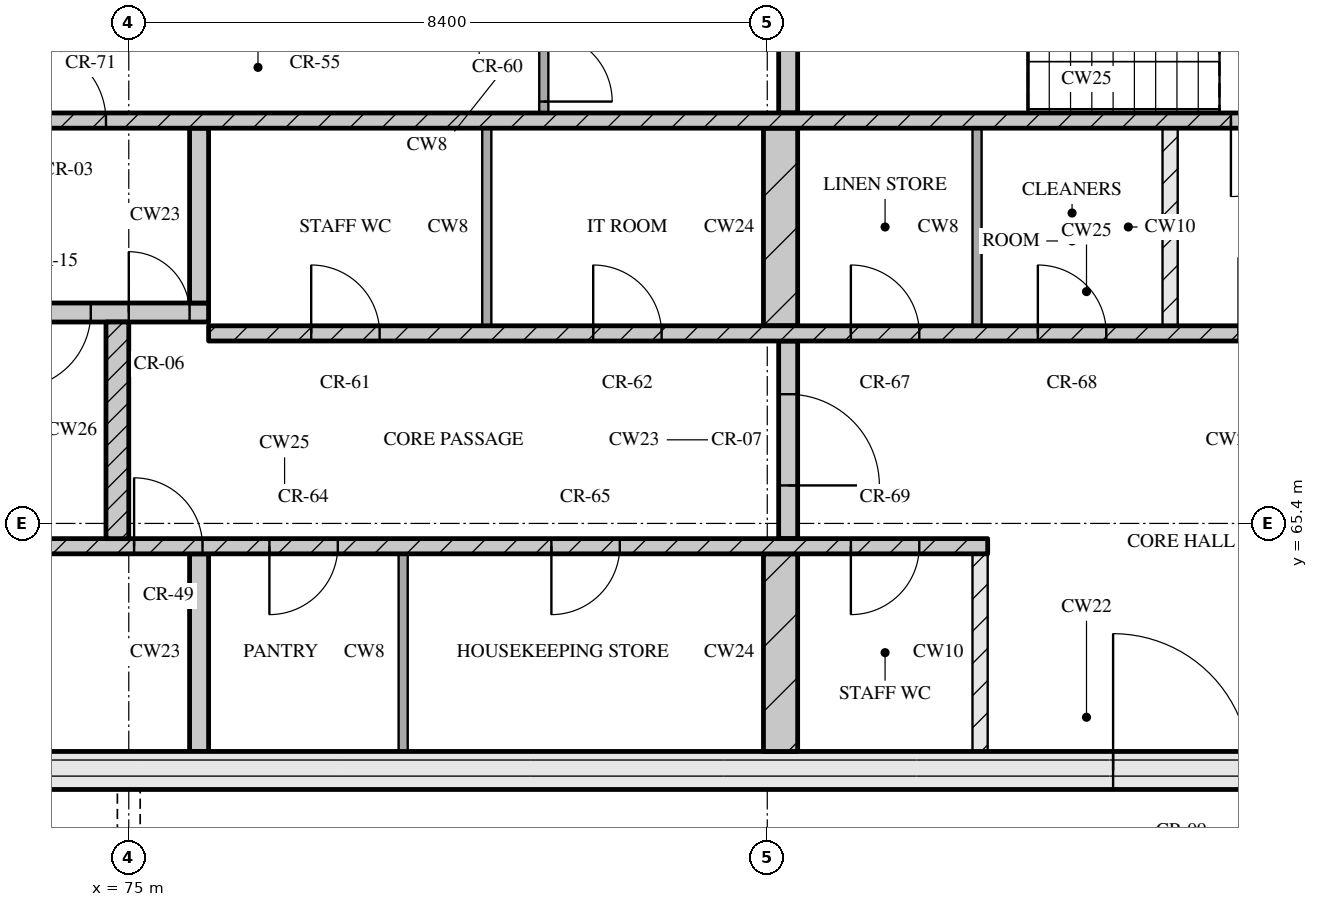
"""IFC4 building model, lengths in metres.
Left out: names, types, materials, properties, quantities, classifications, styles, units other than length and angle.
Written with IfcOpenShell. Run it as: python <this file> out.ifc"""

import sys

from ifc_helpers import new_model, si_unit, direction, frame, frame_2d, origin, place, context, subcontext, project, spatial, rectangle, extrude, element, fill, save


model = new_model("IFC4")
c1 = context("Model", 3, precision=1e-05, world=origin(), true_north=direction((0.0, 1.0)))
c2 = subcontext(c1, "Body", "Model", "MODEL_VIEW")
j1 = project(units=[si_unit("LENGTHUNIT", "METRE"), si_unit("PLANEANGLEUNIT", "RADIAN")], contexts=[c1])
p1 = place(None, origin())
s1 = spatial("IfcSite", under=j1, at=p1, CompositionType="ELEMENT")
p2 = place(p1, origin())
s2 = spatial("IfcBuilding", under=s1, at=p2, CompositionType="ELEMENT")
p3 = place(p2, frame((0.0, 0.0, 281.55)))
s3 = spatial("IfcBuildingStorey", under=s2, at=p3, CompositionType="ELEMENT", Elevation=281.55)
p4 = place(p3, frame((67.3, 62.15, 0.0), z_axis=(0.0, 0.0, 1.0), x_axis=(1.0, 0.0, 0.0)))
e1 = element("IfcWall", 1, at=p4, inside=s3, PredefinedType="SOLIDWALL", context=c2, shape_type="SweptSolid", body=[
    extrude(rectangle(XDim=40.6, YDim=0.5, at=frame_2d((20.3, 0.0))), origin(), (0.0, 0.0, 1.0), 3.32),
])
p5 = place(p4, frame((20.65, 0.0, 0.0)))
e2 = element("IfcOpeningElement", 2, at=p5, cuts=e1, PredefinedType="OPENING", context=c2, shape_type="SweptSolid", body=[
    extrude(rectangle(XDim=1.8, YDim=2.1, at=frame_2d((0.9, 1.05))), frame((0.0, 0.26, 0.0), z_axis=(0.0, -1.0, 0.0), x_axis=(1.0, 0.0, 0.0)), (0.0, 0.0, 1.0), 0.52),
])
p6 = place(p3, frame((75.925, 62.4, 0.0), z_axis=(0.0, 0.0, 1.0), x_axis=(0.0, 1.0, 0.0)))
e3 = element("IfcWall", 3, at=p6, inside=s3, PredefinedType="SOLIDWALL", context=c2, shape_type="SweptSolid", body=[
    extrude(rectangle(XDim=2.6, YDim=0.25, at=frame_2d((1.3, 0.0))), origin(), (0.0, 0.0, 1.0), 3.32),
])
p7 = place(p3, frame((78.61, 62.4, 0.0), z_axis=(0.0, 0.0, 1.0), x_axis=(0.0, 1.0, 0.0)))
e4 = element("IfcWall", 4, at=p7, inside=s3, PredefinedType="PARTITIONING", context=c2, shape_type="SweptSolid", body=[
    extrude(rectangle(XDim=2.6, YDim=0.12, at=frame_2d((1.3, 0.0))), origin(), (0.0, 0.0, 1.0), 3.32),
])
p8 = place(p3, frame((83.575, 62.4, 0.0), z_axis=(0.0, 0.0, 1.0), x_axis=(0.0, 1.0, 0.0)))
e5 = element("IfcWall", 5, at=p8, inside=s3, PredefinedType="SOLIDWALL", context=c2, shape_type="SweptSolid", body=[
    extrude(rectangle(XDim=2.6, YDim=0.45, at=frame_2d((1.3, 0.0))), origin(), (0.0, 0.0, 1.0), 3.32),
])
p9 = place(p3, frame((86.2, 62.4, 0.0), z_axis=(0.0, 0.0, 1.0), x_axis=(0.0, 1.0, 0.0)))
e6 = element("IfcWall", 6, at=p9, inside=s3, PredefinedType="PARTITIONING", context=c2, shape_type="SweptSolid", body=[
    extrude(rectangle(XDim=2.6, YDim=0.2, at=frame_2d((1.3, 0.0))), origin(), (0.0, 0.0, 1.0), 3.32),
])
p10 = place(p3, frame((67.8, 65.1, 0.0), z_axis=(0.0, 0.0, 1.0), x_axis=(1.0, 0.0, 0.0)))
e7 = element("IfcWall", 7, at=p10, inside=s3, PredefinedType="SOLIDWALL", context=c2, shape_type="SweptSolid", body=[
    extrude(rectangle(XDim=18.5, YDim=0.2, at=frame_2d((9.25, 0.0))), origin(), (0.0, 0.0, 1.0), 3.32),
])
p11 = place(p10, frame((7.27, 0.0, 0.0)))
e8 = element("IfcOpeningElement", 8, at=p11, cuts=e7, PredefinedType="OPENING", context=c2, shape_type="SweptSolid", body=[
    extrude(rectangle(XDim=0.9, YDim=2.1, at=frame_2d((0.45, 1.05))), frame((0.0, 0.11, 0.0), z_axis=(0.0, -1.0, 0.0), x_axis=(1.0, 0.0, 0.0)), (0.0, 0.0, 1.0), 0.22),
])
p12 = place(p10, frame((9.05, 0.0, 0.0)))
e9 = element("IfcOpeningElement", 9, at=p12, cuts=e7, PredefinedType="OPENING", context=c2, shape_type="SweptSolid", body=[
    extrude(rectangle(XDim=0.9, YDim=2.1, at=frame_2d((0.45, 1.05))), frame((0.0, 0.11, 0.0), z_axis=(0.0, -1.0, 0.0), x_axis=(1.0, 0.0, 0.0)), (0.0, 0.0, 1.0), 0.22),
])
p13 = place(p10, frame((12.76, 0.0, 0.0)))
e10 = element("IfcOpeningElement", 10, at=p13, cuts=e7, PredefinedType="OPENING", context=c2, shape_type="SweptSolid", body=[
    extrude(rectangle(XDim=0.9, YDim=2.1, at=frame_2d((0.45, 1.05))), frame((0.0, 0.11, 0.0), z_axis=(0.0, -1.0, 0.0), x_axis=(1.0, 0.0, 0.0)), (0.0, 0.0, 1.0), 0.22),
])
p14 = place(p10, frame((16.7, 0.0, 0.0)))
e11 = element("IfcOpeningElement", 11, at=p14, cuts=e7, PredefinedType="OPENING", context=c2, shape_type="SweptSolid", body=[
    extrude(rectangle(XDim=0.9, YDim=2.1, at=frame_2d((0.45, 1.05))), frame((0.0, 0.11, 0.0), z_axis=(0.0, -1.0, 0.0), x_axis=(1.0, 0.0, 0.0)), (0.0, 0.0, 1.0), 0.22),
])
p15 = place(p3, frame((74.85, 65.2, 0.0), z_axis=(0.0, 0.0, 1.0), x_axis=(0.0, 1.0, 0.0)))
e12 = element("IfcWall", 12, at=p15, inside=s3, PredefinedType="SOLIDWALL", context=c2, shape_type="SweptSolid", body=[
    extrude(rectangle(XDim=2.85, YDim=0.3, at=frame_2d((1.425, 0.0))), origin(), (0.0, 0.0, 1.0), 3.32),
])
p16 = place(p3, frame((83.675, 65.2, 0.0), z_axis=(0.0, 0.0, 1.0), x_axis=(0.0, 1.0, 0.0)))
e13 = element("IfcWall", 13, at=p16, inside=s3, PredefinedType="SOLIDWALL", context=c2, shape_type="SweptSolid", body=[
    extrude(rectangle(XDim=2.6, YDim=0.25, at=frame_2d((1.3, 0.0))), origin(), (0.0, 0.0, 1.0), 3.32),
])
p17 = place(p16, frame((0.7, 0.0, 0.0)))
e14 = element("IfcOpeningElement", 14, at=p17, cuts=e13, PredefinedType="OPENING", context=c2, shape_type="SweptSolid", body=[
    extrude(rectangle(XDim=1.2, YDim=2.1, at=frame_2d((0.6, 1.05))), frame((0.0, 0.135, 0.0), z_axis=(0.0, -1.0, 0.0), x_axis=(1.0, 0.0, 0.0)), (0.0, 0.0, 1.0), 0.27),
])
p18 = place(p3, frame((76.05, 67.9, 0.0), z_axis=(0.0, 0.0, 1.0), x_axis=(1.0, 0.0, 0.0)))
e15 = element("IfcWall", 15, at=p18, inside=s3, PredefinedType="SOLIDWALL", context=c2, shape_type="SweptSolid", body=[
    extrude(rectangle(XDim=23.1, YDim=0.2, at=frame_2d((11.55, 0.0))), origin(), (0.0, 0.0, 1.0), 3.32),
])
p19 = place(p18, frame((1.35, 0.0, 0.0)))
e16 = element("IfcOpeningElement", 16, at=p19, cuts=e15, PredefinedType="OPENING", context=c2, shape_type="SweptSolid", body=[
    extrude(rectangle(XDim=0.9, YDim=2.1, at=frame_2d((0.45, 1.05))), frame((0.0, 0.11, 0.0), z_axis=(0.0, -1.0, 0.0), x_axis=(1.0, 0.0, 0.0)), (0.0, 0.0, 1.0), 0.22),
])
p20 = place(p18, frame((5.06, 0.0, 0.0)))
e17 = element("IfcOpeningElement", 17, at=p20, cuts=e15, PredefinedType="OPENING", context=c2, shape_type="SweptSolid", body=[
    extrude(rectangle(XDim=0.9, YDim=2.1, at=frame_2d((0.45, 1.05))), frame((0.0, 0.11, 0.0), z_axis=(0.0, -1.0, 0.0), x_axis=(1.0, 0.0, 0.0)), (0.0, 0.0, 1.0), 0.22),
])
p21 = place(p18, frame((8.45, 0.0, 0.0)))
e18 = element("IfcOpeningElement", 18, at=p21, cuts=e15, PredefinedType="OPENING", context=c2, shape_type="SweptSolid", body=[
    extrude(rectangle(XDim=0.9, YDim=2.1, at=frame_2d((0.45, 1.05))), frame((0.0, 0.11, 0.0), z_axis=(0.0, -1.0, 0.0), x_axis=(1.0, 0.0, 0.0)), (0.0, 0.0, 1.0), 0.22),
])
p22 = place(p18, frame((10.91, 0.0, 0.0)))
e19 = element("IfcOpeningElement", 19, at=p22, cuts=e15, PredefinedType="OPENING", context=c2, shape_type="SweptSolid", body=[
    extrude(rectangle(XDim=0.9, YDim=2.1, at=frame_2d((0.45, 1.05))), frame((0.0, 0.11, 0.0), z_axis=(0.0, -1.0, 0.0), x_axis=(1.0, 0.0, 0.0)), (0.0, 0.0, 1.0), 0.22),
])
p23 = place(p18, frame((13.55, 0.0, 0.0)))
e20 = element("IfcOpeningElement", 20, at=p23, cuts=e15, PredefinedType="OPENING", context=c2, shape_type="SweptSolid", body=[
    extrude(rectangle(XDim=1.0, YDim=2.1, at=frame_2d((0.5, 1.05))), frame((0.0, 0.11, 0.0), z_axis=(0.0, -1.0, 0.0), x_axis=(1.0, 0.0, 0.0)), (0.0, 0.0, 1.0), 0.22),
])
p24 = place(p18, frame((16.2, 0.0, 0.0)))
e21 = element("IfcOpeningElement", 21, at=p24, cuts=e15, PredefinedType="OPENING", context=c2, shape_type="SweptSolid", body=[
    extrude(rectangle(XDim=1.1, YDim=2.1, at=frame_2d((0.55, 1.05))), frame((0.0, 0.11, 0.0), z_axis=(0.0, -1.0, 0.0), x_axis=(1.0, 0.0, 0.0)), (0.0, 0.0, 1.0), 0.22),
])
p25 = place(p18, frame((18.7, 0.0, 0.0)))
e22 = element("IfcOpeningElement", 22, at=p25, cuts=e15, PredefinedType="OPENING", context=c2, shape_type="SweptSolid", body=[
    extrude(rectangle(XDim=1.1, YDim=2.1, at=frame_2d((0.55, 1.05))), frame((0.0, 0.11, 0.0), z_axis=(0.0, -1.0, 0.0), x_axis=(1.0, 0.0, 0.0)), (0.0, 0.0, 1.0), 0.22),
])
p26 = place(p18, frame((21.2, 0.0, 0.0)))
e23 = element("IfcOpeningElement", 23, at=p26, cuts=e15, PredefinedType="OPENING", context=c2, shape_type="SweptSolid", body=[
    extrude(rectangle(XDim=1.1, YDim=2.1, at=frame_2d((0.55, 1.05))), frame((0.0, 0.11, 0.0), z_axis=(0.0, -1.0, 0.0), x_axis=(1.0, 0.0, 0.0)), (0.0, 0.0, 1.0), 0.22),
])
p27 = place(p3, frame((79.71, 68.0, 0.0), z_axis=(0.0, 0.0, 1.0), x_axis=(0.0, 1.0, 0.0)))
e24 = element("IfcWall", 24, at=p27, inside=s3, PredefinedType="PARTITIONING", context=c2, shape_type="SweptSolid", body=[
    extrude(rectangle(XDim=2.6, YDim=0.12, at=frame_2d((1.3, 0.0))), origin(), (0.0, 0.0, 1.0), 3.32),
])
p28 = place(p3, frame((83.575, 68.0, 0.0), z_axis=(0.0, 0.0, 1.0), x_axis=(0.0, 1.0, 0.0)))
e25 = element("IfcWall", 25, at=p28, inside=s3, PredefinedType="SOLIDWALL", context=c2, shape_type="SweptSolid", body=[
    extrude(rectangle(XDim=2.6, YDim=0.45, at=frame_2d((1.3, 0.0))), origin(), (0.0, 0.0, 1.0), 3.32),
])
p29 = place(p3, frame((86.16, 68.0, 0.0), z_axis=(0.0, 0.0, 1.0), x_axis=(0.0, 1.0, 0.0)))
e26 = element("IfcWall", 26, at=p29, inside=s3, PredefinedType="PARTITIONING", context=c2, shape_type="SweptSolid", body=[
    extrude(rectangle(XDim=2.6, YDim=0.12, at=frame_2d((1.3, 0.0))), origin(), (0.0, 0.0, 1.0), 3.32),
])
p30 = place(p3, frame((88.7, 68.0, 0.0), z_axis=(0.0, 0.0, 1.0), x_axis=(0.0, 1.0, 0.0)))
e27 = element("IfcWall", 27, at=p30, inside=s3, PredefinedType="PARTITIONING", context=c2, shape_type="SweptSolid", body=[
    extrude(rectangle(XDim=2.6, YDim=0.2, at=frame_2d((1.3, 0.0))), origin(), (0.0, 0.0, 1.0), 3.32),
])
p31 = place(p3, frame((67.8, 68.175, 0.0), z_axis=(0.0, 0.0, 1.0), x_axis=(1.0, 0.0, 0.0)))
e28 = element("IfcWall", 28, at=p31, inside=s3, PredefinedType="SOLIDWALL", context=c2, shape_type="SweptSolid", body=[
    extrude(rectangle(XDim=8.25, YDim=0.25, at=frame_2d((4.125, 0.0))), origin(), (0.0, 0.0, 1.0), 3.32),
])
p32 = place(p31, frame((5.7, 0.0, 0.0)))
e29 = element("IfcOpeningElement", 29, at=p32, cuts=e28, PredefinedType="OPENING", context=c2, shape_type="SweptSolid", body=[
    extrude(rectangle(XDim=1.0, YDim=2.1, at=frame_2d((0.5, 1.05))), frame((0.0, 0.135, 0.0), z_axis=(0.0, -1.0, 0.0), x_axis=(1.0, 0.0, 0.0)), (0.0, 0.0, 1.0), 0.27),
])
p33 = place(p31, frame((7.2, 0.0, 0.0)))
e30 = element("IfcOpeningElement", 30, at=p33, cuts=e28, PredefinedType="OPENING", context=c2, shape_type="SweptSolid", body=[
    extrude(rectangle(XDim=0.8, YDim=2.1, at=frame_2d((0.4, 1.05))), frame((0.0, 0.135, 0.0), z_axis=(0.0, -1.0, 0.0), x_axis=(1.0, 0.0, 0.0)), (0.0, 0.0, 1.0), 0.27),
])
p34 = place(p3, frame((75.925, 68.3, 0.0), z_axis=(0.0, 0.0, 1.0), x_axis=(0.0, 1.0, 0.0)))
e31 = element("IfcWall", 31, at=p34, inside=s3, PredefinedType="SOLIDWALL", context=c2, shape_type="SweptSolid", body=[
    extrude(rectangle(XDim=2.3, YDim=0.25, at=frame_2d((1.15, 0.0))), origin(), (0.0, 0.0, 1.0), 3.32),
])
p35 = place(p3, frame((67.8, 70.7, 0.0), z_axis=(0.0, 0.0, 1.0), x_axis=(1.0, 0.0, 0.0)))
e32 = element("IfcWall", 32, at=p35, inside=s3, PredefinedType="SOLIDWALL", context=c2, shape_type="SweptSolid", body=[
    extrude(rectangle(XDim=39.6, YDim=0.2, at=frame_2d((19.8, 0.0))), origin(), (0.0, 0.0, 1.0), 3.32),
])
p36 = place(p35, frame((0.65, 0.0, 0.0)))
e33 = element("IfcOpeningElement", 33, at=p36, cuts=e32, PredefinedType="OPENING", context=c2, shape_type="SweptSolid", body=[
    extrude(rectangle(XDim=1.1, YDim=2.1, at=frame_2d((0.55, 1.05))), frame((0.0, 0.11, 0.0), z_axis=(0.0, -1.0, 0.0), x_axis=(1.0, 0.0, 0.0)), (0.0, 0.0, 1.0), 0.22),
])
p37 = place(p35, frame((3.25, 0.0, 0.0)))
e34 = element("IfcOpeningElement", 34, at=p37, cuts=e32, PredefinedType="OPENING", context=c2, shape_type="SweptSolid", body=[
    extrude(rectangle(XDim=1.1, YDim=2.1, at=frame_2d((0.55, 1.05))), frame((0.0, 0.11, 0.0), z_axis=(0.0, -1.0, 0.0), x_axis=(1.0, 0.0, 0.0)), (0.0, 0.0, 1.0), 0.22),
])
p38 = place(p35, frame((5.9, 0.0, 0.0)))
e35 = element("IfcOpeningElement", 35, at=p38, cuts=e32, PredefinedType="OPENING", context=c2, shape_type="SweptSolid", body=[
    extrude(rectangle(XDim=1.0, YDim=2.1, at=frame_2d((0.5, 1.05))), frame((0.0, 0.11, 0.0), z_axis=(0.0, -1.0, 0.0), x_axis=(1.0, 0.0, 0.0)), (0.0, 0.0, 1.0), 0.22),
])
p39 = place(p35, frame((21.7, 0.0, 0.0)))
e36 = element("IfcOpeningElement", 36, at=p39, cuts=e32, PredefinedType="OPENING", context=c2, shape_type="SweptSolid", body=[
    extrude(rectangle(XDim=1.0, YDim=2.1, at=frame_2d((0.5, 1.05))), frame((0.0, 0.11, 0.0), z_axis=(0.0, -1.0, 0.0), x_axis=(1.0, 0.0, 0.0)), (0.0, 0.0, 1.0), 0.22),
])
p40 = place(p35, frame((32.7, 0.0, 0.0)))
e37 = element("IfcOpeningElement", 37, at=p40, cuts=e32, PredefinedType="OPENING", context=c2, shape_type="SweptSolid", body=[
    extrude(rectangle(XDim=1.0, YDim=2.1, at=frame_2d((0.5, 1.05))), frame((0.0, 0.11, 0.0), z_axis=(0.0, -1.0, 0.0), x_axis=(1.0, 0.0, 0.0)), (0.0, 0.0, 1.0), 0.22),
])
p41 = place(p35, frame((35.25, 0.0, 0.0)))
e38 = element("IfcOpeningElement", 38, at=p41, cuts=e32, PredefinedType="OPENING", context=c2, shape_type="SweptSolid", body=[
    extrude(rectangle(XDim=1.1, YDim=2.1, at=frame_2d((0.55, 1.05))), frame((0.0, 0.11, 0.0), z_axis=(0.0, -1.0, 0.0), x_axis=(1.0, 0.0, 0.0)), (0.0, 0.0, 1.0), 0.22),
])
p42 = place(p35, frame((37.85, 0.0, 0.0)))
e39 = element("IfcOpeningElement", 39, at=p42, cuts=e32, PredefinedType="OPENING", context=c2, shape_type="SweptSolid", body=[
    extrude(rectangle(XDim=1.1, YDim=2.1, at=frame_2d((0.55, 1.05))), frame((0.0, 0.11, 0.0), z_axis=(0.0, -1.0, 0.0), x_axis=(1.0, 0.0, 0.0)), (0.0, 0.0, 1.0), 0.22),
])
p43 = place(p3, frame((80.46, 70.8, 0.0), z_axis=(0.0, 0.0, 1.0), x_axis=(0.0, 1.0, 0.0)))
e40 = element("IfcWall", 40, at=p43, inside=s3, PredefinedType="PARTITIONING", context=c2, shape_type="SweptSolid", body=[
    extrude(rectangle(XDim=1.2, YDim=0.12, at=frame_2d((0.6, 0.0))), origin(), (0.0, 0.0, 1.0), 3.32),
])
p44 = place(p43, frame((0.15, 0.0, 0.0)))
e41 = element("IfcOpeningElement", 41, at=p44, cuts=e40, PredefinedType="OPENING", context=c2, shape_type="SweptSolid", body=[
    extrude(rectangle(XDim=0.9, YDim=2.1, at=frame_2d((0.45, 1.05))), frame((0.0, 0.07, 0.0), z_axis=(0.0, -1.0, 0.0), x_axis=(1.0, 0.0, 0.0)), (0.0, 0.0, 1.0), 0.14),
])
p45 = place(p3, frame((83.675, 70.8, 0.0), z_axis=(0.0, 0.0, 1.0), x_axis=(0.0, 1.0, 0.0)))
e42 = element("IfcWall", 42, at=p45, inside=s3, PredefinedType="SOLIDWALL", context=c2, shape_type="SweptSolid", body=[
    extrude(rectangle(XDim=2.95, YDim=0.25, at=frame_2d((1.475, 0.0))), origin(), (0.0, 0.0, 1.0), 3.32),
])
p46 = place(p5, origin())
e43 = element("IfcDoor", 43, at=p46, inside=s3, OperationType="DOUBLE_DOOR_SINGLE_SWING", PredefinedType="DOOR", context=c2, shape_type="SweptSolid", body=[
    extrude(rectangle(XDim=1.8, YDim=2.1, at=frame_2d((0.9, 1.05))), frame((0.0, 0.025, 0.0), z_axis=(0.0, -1.0, 0.0), x_axis=(1.0, 0.0, 0.0)), (0.0, 0.0, 1.0), 0.05),
])
fill(e2, e43)
p47 = place(p11, origin())
e44 = element("IfcDoor", 44, at=p47, inside=s3, OperationType="SINGLE_SWING_LEFT", PredefinedType="DOOR", context=c2, shape_type="SweptSolid", body=[
    extrude(rectangle(XDim=0.9, YDim=2.1, at=frame_2d((0.45, 1.05))), frame((0.0, 0.025, 0.0), z_axis=(0.0, -1.0, 0.0), x_axis=(1.0, 0.0, 0.0)), (0.0, 0.0, 1.0), 0.05),
])
fill(e8, e44)
p48 = place(p12, origin())
e45 = element("IfcDoor", 45, at=p48, inside=s3, OperationType="SINGLE_SWING_RIGHT", PredefinedType="DOOR", context=c2, shape_type="SweptSolid", body=[
    extrude(rectangle(XDim=0.9, YDim=2.1, at=frame_2d((0.45, 1.05))), frame((0.0, 0.025, 0.0), z_axis=(0.0, -1.0, 0.0), x_axis=(1.0, 0.0, 0.0)), (0.0, 0.0, 1.0), 0.05),
])
fill(e9, e45)
p49 = place(p13, origin())
e46 = element("IfcDoor", 46, at=p49, inside=s3, OperationType="SINGLE_SWING_RIGHT", PredefinedType="DOOR", context=c2, shape_type="SweptSolid", body=[
    extrude(rectangle(XDim=0.9, YDim=2.1, at=frame_2d((0.45, 1.05))), frame((0.0, 0.025, 0.0), z_axis=(0.0, -1.0, 0.0), x_axis=(1.0, 0.0, 0.0)), (0.0, 0.0, 1.0), 0.05),
])
fill(e10, e46)
p50 = place(p14, origin())
e47 = element("IfcDoor", 47, at=p50, inside=s3, OperationType="SINGLE_SWING_RIGHT", PredefinedType="DOOR", context=c2, shape_type="SweptSolid", body=[
    extrude(rectangle(XDim=0.9, YDim=2.1, at=frame_2d((0.45, 1.05))), frame((0.0, 0.025, 0.0), z_axis=(0.0, -1.0, 0.0), x_axis=(1.0, 0.0, 0.0)), (0.0, 0.0, 1.0), 0.05),
])
fill(e11, e47)
p51 = place(p17, origin())
e48 = element("IfcDoor", 48, at=p51, inside=s3, OperationType="SINGLE_SWING_RIGHT", PredefinedType="DOOR", context=c2, shape_type="SweptSolid", body=[
    extrude(rectangle(XDim=1.2, YDim=2.1, at=frame_2d((0.6, 1.05))), frame((0.0, 0.025, 0.0), z_axis=(0.0, -1.0, 0.0), x_axis=(1.0, 0.0, 0.0)), (0.0, 0.0, 1.0), 0.05),
])
fill(e14, e48)
p52 = place(p19, origin())
e49 = element("IfcDoor", 49, at=p52, inside=s3, OperationType="SINGLE_SWING_LEFT", PredefinedType="DOOR", context=c2, shape_type="SweptSolid", body=[
    extrude(rectangle(XDim=0.9, YDim=2.1, at=frame_2d((0.45, 1.05))), frame((0.0, 0.025, 0.0), z_axis=(0.0, -1.0, 0.0), x_axis=(1.0, 0.0, 0.0)), (0.0, 0.0, 1.0), 0.05),
])
fill(e16, e49)
p53 = place(p20, origin())
e50 = element("IfcDoor", 50, at=p53, inside=s3, OperationType="SINGLE_SWING_LEFT", PredefinedType="DOOR", context=c2, shape_type="SweptSolid", body=[
    extrude(rectangle(XDim=0.9, YDim=2.1, at=frame_2d((0.45, 1.05))), frame((0.0, 0.025, 0.0), z_axis=(0.0, -1.0, 0.0), x_axis=(1.0, 0.0, 0.0)), (0.0, 0.0, 1.0), 0.05),
])
fill(e17, e50)
p54 = place(p21, origin())
e51 = element("IfcDoor", 51, at=p54, inside=s3, OperationType="SINGLE_SWING_LEFT", PredefinedType="DOOR", context=c2, shape_type="SweptSolid", body=[
    extrude(rectangle(XDim=0.9, YDim=2.1, at=frame_2d((0.45, 1.05))), frame((0.0, 0.025, 0.0), z_axis=(0.0, -1.0, 0.0), x_axis=(1.0, 0.0, 0.0)), (0.0, 0.0, 1.0), 0.05),
])
fill(e18, e51)
p55 = place(p22, origin())
e52 = element("IfcDoor", 52, at=p55, inside=s3, OperationType="SINGLE_SWING_LEFT", PredefinedType="DOOR", context=c2, shape_type="SweptSolid", body=[
    extrude(rectangle(XDim=0.9, YDim=2.1, at=frame_2d((0.45, 1.05))), frame((0.0, 0.025, 0.0), z_axis=(0.0, -1.0, 0.0), x_axis=(1.0, 0.0, 0.0)), (0.0, 0.0, 1.0), 0.05),
])
fill(e19, e52)
p56 = place(p32, origin())
e53 = element("IfcDoor", 53, at=p56, inside=s3, OperationType="SINGLE_SWING_RIGHT", PredefinedType="DOOR", context=c2, shape_type="SweptSolid", body=[
    extrude(rectangle(XDim=1.0, YDim=2.1, at=frame_2d((0.5, 1.05))), frame((0.0, 0.025, 0.0), z_axis=(0.0, -1.0, 0.0), x_axis=(1.0, 0.0, 0.0)), (0.0, 0.0, 1.0), 0.05),
])
fill(e29, e53)
p57 = place(p33, origin())
e54 = element("IfcDoor", 54, at=p57, inside=s3, OperationType="SINGLE_SWING_LEFT", PredefinedType="DOOR", context=c2, shape_type="SweptSolid", body=[
    extrude(rectangle(XDim=0.8, YDim=2.1, at=frame_2d((0.4, 1.05))), frame((0.0, 0.025, 0.0), z_axis=(0.0, -1.0, 0.0), x_axis=(1.0, 0.0, 0.0)), (0.0, 0.0, 1.0), 0.05),
])
fill(e30, e54)
p58 = place(p38, origin())
e55 = element("IfcDoor", 55, at=p58, inside=s3, OperationType="SINGLE_SWING_LEFT", PredefinedType="DOOR", context=c2, shape_type="SweptSolid", body=[
    extrude(rectangle(XDim=1.0, YDim=2.1, at=frame_2d((0.5, 1.05))), frame((0.0, 0.025, 0.0), z_axis=(0.0, -1.0, 0.0), x_axis=(1.0, 0.0, 0.0)), (0.0, 0.0, 1.0), 0.05),
])
fill(e35, e55)
p59 = place(p39, origin())
e56 = element("IfcDoor", 56, at=p59, inside=s3, OperationType="SINGLE_SWING_RIGHT", PredefinedType="DOOR", context=c2, shape_type="SweptSolid", body=[
    extrude(rectangle(XDim=1.0, YDim=2.1, at=frame_2d((0.5, 1.05))), frame((0.0, 0.025, 0.0), z_axis=(0.0, -1.0, 0.0), x_axis=(1.0, 0.0, 0.0)), (0.0, 0.0, 1.0), 0.05),
])
fill(e36, e56)
p60 = place(p44, origin())
e57 = element("IfcDoor", 57, at=p60, inside=s3, OperationType="SINGLE_SWING_RIGHT", PredefinedType="DOOR", context=c2, shape_type="SweptSolid", body=[
    extrude(rectangle(XDim=0.9, YDim=2.1, at=frame_2d((0.45, 1.05))), frame((0.0, 0.025, 0.0), z_axis=(0.0, -1.0, 0.0), x_axis=(1.0, 0.0, 0.0)), (0.0, 0.0, 1.0), 0.05),
])
fill(e41, e57)
save(model, sys.argv[1])
